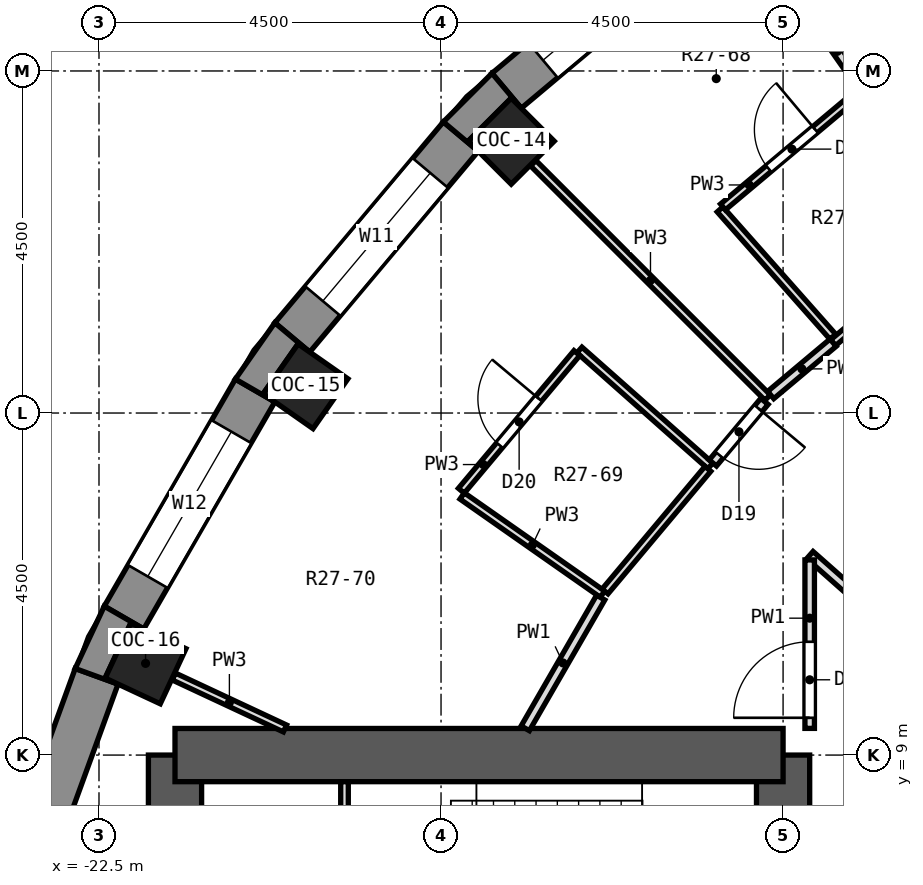
"""IFC4 building model, lengths in metres.
Left out: names, types, materials, properties, quantities, classifications, styles, units other than length and angle.
Written with IfcOpenShell. Run it as: python <this file> out.ifc"""

import sys

from ifc_helpers import new_model, si_unit, direction, frame, frame_2d, origin, origin_2d, place, context, subcontext, project, spatial, polyline, rectangle, outline, extrude, element, fill, save


model = new_model("IFC4")
c1 = context("Model", 3, precision=1e-05, world=origin(), true_north=direction((0.0, 1.0)))
c2 = subcontext(c1, "Body", "Model", "MODEL_VIEW")
j1 = project(units=[si_unit("LENGTHUNIT", "METRE"), si_unit("PLANEANGLEUNIT", "RADIAN")], contexts=[c1])
p1 = place(None, origin())
s1 = spatial("IfcSite", under=j1, at=p1, CompositionType="ELEMENT")
p2 = place(p1, origin())
s2 = spatial("IfcBuilding", under=s1, at=p2, CompositionType="ELEMENT")
p3 = place(p2, frame((0.0, 0.0, 180.6)))
s3 = spatial("IfcBuildingStorey", under=s2, at=p3, CompositionType="ELEMENT", Elevation=180.6)
for number, where, z_axis, x_axis in (
    (1, (-17.077, 17.077, 0.0), (0.0, 0.0, 1.0), (-0.707, 0.707, 0.0)),
    (2, (-19.782, 13.852, 0.0), (0.0, 0.0, 1.0), (-0.819, 0.574, 0.0)),
    (3, (-21.887, 10.206, 0.0), (0.0, 0.0, 1.0), (-0.906, 0.423, 0.0)),
):
    element("IfcColumn", number, at=place(p3, frame(where, z_axis=z_axis, x_axis=x_axis)), inside=s3, PredefinedType="COLUMN", context=c2, shape_type="SweptSolid", body=[
        extrude(rectangle(XDim=0.8, YDim=0.8, at=origin_2d()), origin(), (0.0, 0.0, 1.0), 3.3),
    ])
p4 = place(p3, frame((-13.5, -9.0, 0.0), z_axis=(0.0, 0.0, 1.0), x_axis=(0.0, 1.0, 0.0)))
e4 = element("IfcWall", 4, at=p4, inside=s3, PredefinedType="SHEAR", context=c2, shape_type="SweptSolid", body=[
    extrude(rectangle(XDim=18.0, YDim=0.7, at=frame_2d((9.0, 0.0))), origin(), (0.0, 0.0, 1.0), 3.3),
])
p5 = place(p4, frame((15.4, 0.0, 0.0)))
e5 = element("IfcOpeningElement", 5, at=p5, cuts=e4, PredefinedType="OPENING", context=c2, shape_type="SweptSolid", body=[
    extrude(rectangle(XDim=1.2, YDim=2.1, at=frame_2d((0.6, 1.05))), frame((0.0, 0.362, 0.0), z_axis=(0.0, -1.0, 0.0), x_axis=(1.0, 0.0, 0.0)), (0.0, 0.0, 1.0), 0.724),
])
p6 = place(p4, frame((1.4, 0.0, 0.0)))
e6 = element("IfcOpeningElement", 6, at=p6, cuts=e4, PredefinedType="OPENING", context=c2, shape_type="SweptSolid", body=[
    extrude(rectangle(XDim=1.2, YDim=2.1, at=frame_2d((0.6, 1.05))), frame((0.0, 0.362, 0.0), z_axis=(0.0, -1.0, 0.0), x_axis=(1.0, 0.0, 0.0)), (0.0, 0.0, 1.0), 0.724),
])
p7 = place(p4, frame((7.5, 0.0, 0.0)))
e7 = element("IfcOpeningElement", 7, at=p7, cuts=e4, PredefinedType="OPENING", context=c2, shape_type="SweptSolid", body=[
    extrude(rectangle(XDim=3.0, YDim=2.4, at=frame_2d((1.5, 1.2))), frame((0.0, 0.362, 0.0), z_axis=(0.0, -1.0, 0.0), x_axis=(1.0, 0.0, 0.0)), (0.0, 0.0, 1.0), 0.724),
])
p8 = place(p3, frame((-21.5, -9.0, 0.0), z_axis=(0.0, 0.0, 1.0), x_axis=(0.0, 1.0, 0.0)))
e8 = element("IfcWall", 8, at=p8, inside=s3, PredefinedType="SHEAR", context=c2, shape_type="SweptSolid", body=[
    extrude(rectangle(XDim=18.0, YDim=0.7, at=frame_2d((9.0, 0.0))), origin(), (0.0, 0.0, 1.0), 3.3),
])
p9 = place(p8, frame((9.45, 0.0, 0.0)))
e9 = element("IfcOpeningElement", 9, at=p9, cuts=e8, PredefinedType="OPENING", context=c2, shape_type="SweptSolid", body=[
    extrude(rectangle(XDim=0.9, YDim=2.1, at=frame_2d((0.45, 1.05))), frame((0.0, 0.362, 0.0), z_axis=(0.0, -1.0, 0.0), x_axis=(1.0, 0.0, 0.0)), (0.0, 0.0, 1.0), 0.724),
])
p10 = place(p8, frame((7.65, 0.0, 0.0)))
e10 = element("IfcOpeningElement", 10, at=p10, cuts=e8, PredefinedType="OPENING", context=c2, shape_type="SweptSolid", body=[
    extrude(rectangle(XDim=0.9, YDim=2.1, at=frame_2d((0.45, 1.05))), frame((0.0, 0.362, 0.0), z_axis=(0.0, -1.0, 0.0), x_axis=(1.0, 0.0, 0.0)), (0.0, 0.0, 1.0), 0.724),
])
p11 = place(p3, frame((-13.5, 9.0, 0.0), z_axis=(0.0, 0.0, 1.0), x_axis=(-1.0, 0.0, 0.0)))
e11 = element("IfcWall", 11, at=p11, inside=s3, PredefinedType="SHEAR", context=c2, shape_type="SweptSolid", body=[
    extrude(rectangle(XDim=8.0, YDim=0.7, at=frame_2d((4.0, 0.0))), origin(), (0.0, 0.0, 1.0), 3.3),
])
p12 = place(p3, frame((-14.494, 19.957, 0.0), z_axis=(0.0, 0.0, 1.0), x_axis=(-0.766058884809, -0.642770398358, 0.0)))
e12 = element("IfcWall", 12, at=p12, inside=s3, PredefinedType="SOLIDWALL", context=c2, shape_type="SweptSolid", body=[
    extrude(rectangle(XDim=3.449, YDim=0.6, at=frame_2d((1.725, 0.0))), origin(), (0.0, 0.0, 1.0), 2.85),
])
p13 = place(p12, frame((0.625, 0.0, 0.9)))
e13 = element("IfcOpeningElement", 13, at=p13, cuts=e12, PredefinedType="OPENING", context=c2, shape_type="SweptSolid", body=[
    extrude(rectangle(XDim=2.2, YDim=1.8, at=frame_2d((1.1, 0.9))), frame((0.0, 0.312, 0.0), z_axis=(0.0, -1.0, 0.0), x_axis=(1.0, 0.0, 0.0)), (0.0, 0.0, 1.0), 0.624),
])
p14 = place(p3, frame((-17.74, 17.137, 0.0), z_axis=(0.0, 0.0, 1.0), x_axis=(-0.642770398358, -0.766058884809, 0.0)))
e14 = element("IfcWall", 14, at=p14, inside=s3, PredefinedType="SOLIDWALL", context=c2, shape_type="SweptSolid", body=[
    extrude(rectangle(XDim=3.449, YDim=0.6, at=frame_2d((1.725, 0.0))), origin(), (0.0, 0.0, 1.0), 2.85),
])
p15 = place(p14, frame((0.625, 0.0, 0.9)))
e15 = element("IfcOpeningElement", 15, at=p15, cuts=e14, PredefinedType="OPENING", context=c2, shape_type="SweptSolid", body=[
    extrude(rectangle(XDim=2.2, YDim=1.8, at=frame_2d((1.1, 0.9))), frame((0.0, 0.312, 0.0), z_axis=(0.0, -1.0, 0.0), x_axis=(1.0, 0.0, 0.0)), (0.0, 0.0, 1.0), 0.624),
])
p16 = place(p3, frame((-20.446, 13.796, 0.0), z_axis=(0.0, 0.0, 1.0), x_axis=(-0.499998129301, -0.86602648383, 0.0)))
e16 = element("IfcWall", 16, at=p16, inside=s3, PredefinedType="SOLIDWALL", context=c2, shape_type="SweptSolid", body=[
    extrude(rectangle(XDim=3.45, YDim=0.6, at=frame_2d((1.725, 0.0))), origin(), (0.0, 0.0, 1.0), 2.85),
])
p17 = place(p16, frame((0.625, 0.0, 0.9)))
e17 = element("IfcOpeningElement", 17, at=p17, cuts=e16, PredefinedType="OPENING", context=c2, shape_type="SweptSolid", body=[
    extrude(rectangle(XDim=2.2, YDim=1.8, at=frame_2d((1.1, 0.9))), frame((0.0, 0.312, 0.0), z_axis=(0.0, -1.0, 0.0), x_axis=(1.0, 0.0, 0.0)), (0.0, 0.0, 1.0), 0.624),
])
p18 = place(p3, frame((-22.531, 10.036, 0.0), z_axis=(0.0, 0.0, 1.0), x_axis=(-0.342032843455, -0.93968799822, 0.0)))
e18 = element("IfcWall", 18, at=p18, inside=s3, PredefinedType="SOLIDWALL", context=c2, shape_type="SweptSolid", body=[
    extrude(rectangle(XDim=3.45, YDim=0.6, at=frame_2d((1.725, 0.0))), origin(), (0.0, 0.0, 1.0), 2.85),
])
p19 = place(p3, origin())
e19 = element("IfcWall", 19, at=p19, inside=s3, PredefinedType="SOLIDWALL", context=c2, shape_type="SweptSolid", body=[
    extrude(outline(polyline([(-17.969, 17.33), (-17.51, 16.944), (-17.642, 17.077), (-17.077, 17.642), (-16.944, 17.51), (-17.33, 17.969), (-17.969, 17.33)])), origin(), (0.0, 0.0, 1.0), 2.85),
])
p20 = place(p3, origin())
e20 = element("IfcWall", 20, at=p20, inside=s3, PredefinedType="SOLIDWALL", context=c2, shape_type="SweptSolid", body=[
    extrude(outline(polyline([(-20.187, 14.687), (-20.706, 13.946), (-20.186, 13.646), (-20.34, 13.754), (-19.881, 14.409), (-19.727, 14.302), (-20.187, 14.687)])), origin(), (0.0, 0.0, 1.0), 2.85),
])
p21 = place(p3, origin())
e21 = element("IfcWall", 21, at=p21, inside=s3, PredefinedType="SOLIDWALL", context=c2, shape_type="SweptSolid", body=[
    extrude(outline(polyline([(-22.813, 10.139), (-22.249, 9.934), (-22.419, 10.013), (-22.081, 10.738), (-21.911, 10.659), (-22.431, 10.959), (-22.813, 10.139)])), origin(), (0.0, 0.0, 1.0), 2.85),
])
p22 = place(p3, frame((-13.617, 19.447, 0.0), z_axis=(0.0, 0.0, 1.0), x_axis=(0.573568678046, -0.819157476658, 0.0)))
e22 = element("IfcWall", 22, at=p22, inside=s3, PredefinedType="PARTITIONING", context=c2, shape_type="SweptSolid", body=[
    extrude(rectangle(XDim=2.003, YDim=0.125, at=frame_2d((1.001, 0.0))), origin(), (0.0, 0.0, 1.0), 2.85),
])
p23 = place(p22, frame((0.248, 0.0, 0.0)))
e23 = element("IfcOpeningElement", 23, at=p23, cuts=e22, PredefinedType="OPENING", context=c2, shape_type="SweptSolid", body=[
    extrude(rectangle(XDim=0.9, YDim=2.1, at=frame_2d((0.45, 1.05))), frame((0.0, 0.074, 0.0), z_axis=(0.0, -1.0, 0.0), x_axis=(1.0, 0.0, 0.0)), (0.0, 0.0, 1.0), 0.149),
])
p24 = place(p3, frame((-14.329, 16.179, 0.0), z_axis=(0.0, 0.0, 1.0), x_axis=(0.663042232896, -0.748581991098, 0.0)))
e24 = element("IfcWall", 24, at=p24, inside=s3, PredefinedType="PARTITIONING", context=c2, shape_type="SweptSolid", body=[
    extrude(rectangle(XDim=2.238, YDim=0.1, at=frame_2d((1.119, 0.0))), origin(), (0.0, 0.0, 1.0), 2.85),
])
p25 = place(p3, frame((-16.787, 16.787, 0.0), z_axis=(0.0, 0.0, 1.0), x_axis=(0.707106781187, -0.707106781187, 0.0)))
e25 = element("IfcWall", 25, at=p25, inside=s3, PredefinedType="PARTITIONING", context=c2, shape_type="SweptSolid", body=[
    extrude(rectangle(XDim=4.361, YDim=0.1, at=frame_2d((2.181, 0.0))), origin(), (0.0, 0.0, 1.0), 2.85),
])
p26 = place(p3, frame((-16.179, 14.329, 0.0), z_axis=(0.0, 0.0, 1.0), x_axis=(0.74859119091, -0.663031846061, 0.0)))
e26 = element("IfcWall", 26, at=p26, inside=s3, PredefinedType="PARTITIONING", context=c2, shape_type="SweptSolid", body=[
    extrude(rectangle(XDim=2.3, YDim=0.1, at=frame_2d((1.15, 0.0))), origin(), (0.0, 0.0, 1.0), 2.85),
])
p27 = place(p3, frame((-13.147, 11.631, 0.0), z_axis=(0.0, 0.0, 1.0), x_axis=(0.748973743587, -0.66259967659, 0.0)))
e27 = element("IfcWall", 27, at=p27, inside=s3, PredefinedType="PARTITIONING", context=c2, shape_type="SweptSolid", body=[
    extrude(rectangle(XDim=1.634, YDim=0.125, at=frame_2d((0.817, 0.0))), origin(), (0.0, 0.0, 1.0), 2.85),
])
p28 = place(p3, frame((-17.722, 12.409, 0.0), z_axis=(0.0, 0.0, 1.0), x_axis=(0.819165747117, -0.573556866187, 0.0)))
e28 = element("IfcWall", 28, at=p28, inside=s3, PredefinedType="PARTITIONING", context=c2, shape_type="SweptSolid", body=[
    extrude(rectangle(XDim=2.253, YDim=0.1, at=frame_2d((1.127, 0.0))), origin(), (0.0, 0.0, 1.0), 2.85),
])
p29 = place(p3, frame((-21.516, 10.033, 0.0), z_axis=(0.0, 0.0, 1.0), x_axis=(0.906055596822, -0.423158664648, 0.0)))
e29 = element("IfcWall", 29, at=p29, inside=s3, PredefinedType="PARTITIONING", context=c2, shape_type="SweptSolid", body=[
    extrude(rectangle(XDim=1.614, YDim=0.1, at=frame_2d((0.807, 0.0))), origin(), (0.0, 0.0, 1.0), 2.85),
])
p30 = place(p3, frame((-12.842, 14.425, 0.0), z_axis=(0.0, 0.0, 1.0), x_axis=(0.766089344118, 0.642734094964, 0.0)))
e30 = element("IfcWall", 30, at=p30, inside=s3, PredefinedType="PARTITIONING", context=c2, shape_type="SweptSolid", body=[
    extrude(rectangle(XDim=2.201, YDim=0.1, at=frame_2d((1.101, 0.0))), origin(), (0.0, 0.0, 1.0), 2.85),
])
p31 = place(p3, frame((-13.663, 13.737, 0.0), z_axis=(0.0, 0.0, 1.0), x_axis=(0.766198786717, 0.642603625288, 0.0)))
e31 = element("IfcWall", 31, at=p31, inside=s3, PredefinedType="PARTITIONING", context=c2, shape_type="SweptSolid", body=[
    extrude(rectangle(XDim=1.071, YDim=0.125, at=frame_2d((0.535, 0.0))), origin(), (0.0, 0.0, 1.0), 2.85),
])
p32 = place(p3, frame((-14.291, 16.211, 0.0), z_axis=(0.0, 0.0, 1.0), x_axis=(0.766049914327, 0.642781089299, 0.0)))
e32 = element("IfcWall", 32, at=p32, inside=s3, PredefinedType="PARTITIONING", context=c2, shape_type="SweptSolid", body=[
    extrude(rectangle(XDim=2.355, YDim=0.1, at=frame_2d((1.177, 0.0))), origin(), (0.0, 0.0, 1.0), 2.85),
])
p33 = place(p32, frame((0.784, 0.0, 0.0)))
e33 = element("IfcOpeningElement", 33, at=p33, cuts=e32, PredefinedType="OPENING", context=c2, shape_type="SweptSolid", body=[
    extrude(rectangle(XDim=0.8, YDim=2.1, at=frame_2d((0.4, 1.05))), frame((0.0, 0.062, 0.0), z_axis=(0.0, -1.0, 0.0), x_axis=(1.0, 0.0, 0.0)), (0.0, 0.0, 1.0), 0.124),
])
p34 = place(p3, frame((-15.842, 11.153, 0.0), z_axis=(0.0, 0.0, 1.0), x_axis=(0.642759429892, 0.766068087891, 0.0)))
e34 = element("IfcWall", 34, at=p34, inside=s3, PredefinedType="PARTITIONING", context=c2, shape_type="SweptSolid", body=[
    extrude(rectangle(XDim=2.105, YDim=0.1, at=frame_2d((1.052, 0.0))), origin(), (0.0, 0.0, 1.0), 2.85),
])
p35 = place(p3, frame((-14.424, 12.843, 0.0), z_axis=(0.0, 0.0, 1.0), x_axis=(0.642498544186, 0.766286904964, 0.0)))
e35 = element("IfcWall", 35, at=p35, inside=s3, PredefinedType="PARTITIONING", context=c2, shape_type="SweptSolid", body=[
    extrude(rectangle(XDim=1.057, YDim=0.125, at=frame_2d((0.529, 0.0))), origin(), (0.0, 0.0, 1.0), 2.85),
])
p36 = place(p35, frame((0.135, 0.0, 0.0)))
e36 = element("IfcOpeningElement", 36, at=p36, cuts=e35, PredefinedType="OPENING", context=c2, shape_type="SweptSolid", body=[
    extrude(rectangle(XDim=0.8, YDim=2.1, at=frame_2d((0.4, 1.05))), frame((0.0, 0.074, 0.0), z_axis=(0.0, -1.0, 0.0), x_axis=(1.0, 0.0, 0.0)), (0.0, 0.0, 1.0), 0.149),
])
p37 = place(p3, frame((-17.733, 12.477, 0.0), z_axis=(0.0, 0.0, 1.0), x_axis=(0.64278038415, 0.766050506006, 0.0)))
e37 = element("IfcWall", 37, at=p37, inside=s3, PredefinedType="PARTITIONING", context=c2, shape_type="SweptSolid", body=[
    extrude(rectangle(XDim=2.365, YDim=0.1, at=frame_2d((1.182, 0.0))), origin(), (0.0, 0.0, 1.0), 2.85),
])
p38 = place(p37, frame((0.783, 0.0, 0.0)))
e38 = element("IfcOpeningElement", 38, at=p38, cuts=e37, PredefinedType="OPENING", context=c2, shape_type="SweptSolid", body=[
    extrude(rectangle(XDim=0.8, YDim=2.1, at=frame_2d((0.4, 1.05))), frame((0.0, 0.062, 0.0), z_axis=(0.0, -1.0, 0.0), x_axis=(1.0, 0.0, 0.0)), (0.0, 0.0, 1.0), 0.124),
])
p39 = place(p3, frame((-16.892, 9.352, 0.0), z_axis=(0.0, 0.0, 1.0), x_axis=(0.499683424426, 0.866208101644, 0.0)))
e39 = element("IfcWall", 39, at=p39, inside=s3, PredefinedType="PARTITIONING", context=c2, shape_type="SweptSolid", body=[
    extrude(rectangle(XDim=1.986, YDim=0.125, at=frame_2d((0.993, 0.0))), origin(), (0.0, 0.0, 1.0), 2.85),
])
p40 = place(p3, frame((-13.15, 9.351, 0.0), z_axis=(0.0, 0.0, 1.0), x_axis=(0.0, 1.0, 0.0)))
e40 = element("IfcWall", 40, at=p40, inside=s3, PredefinedType="PARTITIONING", context=c2, shape_type="SweptSolid", body=[
    extrude(rectangle(XDim=2.216, YDim=0.125, at=frame_2d((1.108, 0.0))), origin(), (0.0, 0.0, 1.0), 2.85),
])
p41 = place(p40, frame((0.139, 0.0, 0.0)))
e41 = element("IfcOpeningElement", 41, at=p41, cuts=e40, PredefinedType="OPENING", context=c2, shape_type="SweptSolid", body=[
    extrude(rectangle(XDim=1.0, YDim=2.1, at=frame_2d((0.5, 1.05))), frame((0.0, 0.074, 0.0), z_axis=(0.0, -1.0, 0.0), x_axis=(1.0, 0.0, 0.0)), (0.0, 0.0, 1.0), 0.149),
])
p42 = place(p3, frame((-19.27, 5.2, 0.0), z_axis=(0.0, 0.0, 1.0), x_axis=(0.0, 1.0, 0.0)))
e42 = element("IfcWall", 42, at=p42, inside=s3, PredefinedType="PARTITIONING", context=c2, shape_type="SweptSolid", body=[
    extrude(rectangle(XDim=3.45, YDim=0.1, at=frame_2d((1.725, 0.0))), origin(), (0.0, 0.0, 1.0), 2.85),
])
p43 = place(p13, origin())
e43 = element("IfcWindow", 43, at=p43, inside=s3, PartitioningType="SINGLE_PANEL", PredefinedType="WINDOW", context=c2, shape_type="SweptSolid", body=[
    extrude(rectangle(XDim=2.2, YDim=1.8, at=frame_2d((1.1, 0.9))), frame((0.0, 0.18, 0.0), z_axis=(0.0, -1.0, 0.0), x_axis=(1.0, 0.0, 0.0)), (0.0, 0.0, 1.0), 0.06),
])
fill(e13, e43)
p44 = place(p15, origin())
e44 = element("IfcWindow", 44, at=p44, inside=s3, PartitioningType="SINGLE_PANEL", PredefinedType="WINDOW", context=c2, shape_type="SweptSolid", body=[
    extrude(rectangle(XDim=2.2, YDim=1.8, at=frame_2d((1.1, 0.9))), frame((0.0, 0.18, 0.0), z_axis=(0.0, -1.0, 0.0), x_axis=(1.0, 0.0, 0.0)), (0.0, 0.0, 1.0), 0.06),
])
fill(e15, e44)
p45 = place(p17, origin())
e45 = element("IfcWindow", 45, at=p45, inside=s3, PartitioningType="SINGLE_PANEL", PredefinedType="WINDOW", context=c2, shape_type="SweptSolid", body=[
    extrude(rectangle(XDim=2.2, YDim=1.8, at=frame_2d((1.1, 0.9))), frame((0.0, 0.18, 0.0), z_axis=(0.0, -1.0, 0.0), x_axis=(1.0, 0.0, 0.0)), (0.0, 0.0, 1.0), 0.06),
])
fill(e17, e45)
p46 = place(p33, origin())
e46 = element("IfcDoor", 46, at=p46, inside=s3, OperationType="SINGLE_SWING_RIGHT", PredefinedType="DOOR", context=c2, shape_type="SweptSolid", body=[
    extrude(rectangle(XDim=0.8, YDim=2.1, at=frame_2d((0.4, 1.05))), frame((0.0, 0.025, 0.0), z_axis=(0.0, -1.0, 0.0), x_axis=(1.0, 0.0, 0.0)), (0.0, 0.0, 1.0), 0.05),
])
fill(e33, e46)
p47 = place(p36, frame((0.8, 0.0, 0.0), z_axis=(0.0, 0.0, 1.0), x_axis=(-1.0, 0.0, 0.0)))
e47 = element("IfcDoor", 47, at=p47, inside=s3, OperationType="SINGLE_SWING_LEFT", PredefinedType="DOOR", context=c2, shape_type="SweptSolid", body=[
    extrude(rectangle(XDim=0.8, YDim=2.1, at=frame_2d((0.4, 1.05))), frame((0.0, 0.025, 0.0), z_axis=(0.0, -1.0, 0.0), x_axis=(1.0, 0.0, 0.0)), (0.0, 0.0, 1.0), 0.05),
])
fill(e36, e47)
p48 = place(p38, origin())
e48 = element("IfcDoor", 48, at=p48, inside=s3, OperationType="SINGLE_SWING_RIGHT", PredefinedType="DOOR", context=c2, shape_type="SweptSolid", body=[
    extrude(rectangle(XDim=0.8, YDim=2.1, at=frame_2d((0.4, 1.05))), frame((0.0, 0.025, 0.0), z_axis=(0.0, -1.0, 0.0), x_axis=(1.0, 0.0, 0.0)), (0.0, 0.0, 1.0), 0.05),
])
fill(e38, e48)
p49 = place(p41, origin())
e49 = element("IfcDoor", 49, at=p49, inside=s3, OperationType="SINGLE_SWING_LEFT", PredefinedType="DOOR", context=c2, shape_type="SweptSolid", body=[
    extrude(rectangle(XDim=1.0, YDim=2.1, at=frame_2d((0.5, 1.05))), frame((0.0, 0.025, 0.0), z_axis=(0.0, -1.0, 0.0), x_axis=(1.0, 0.0, 0.0)), (0.0, 0.0, 1.0), 0.05),
])
fill(e41, e49)
save(model, sys.argv[1])
